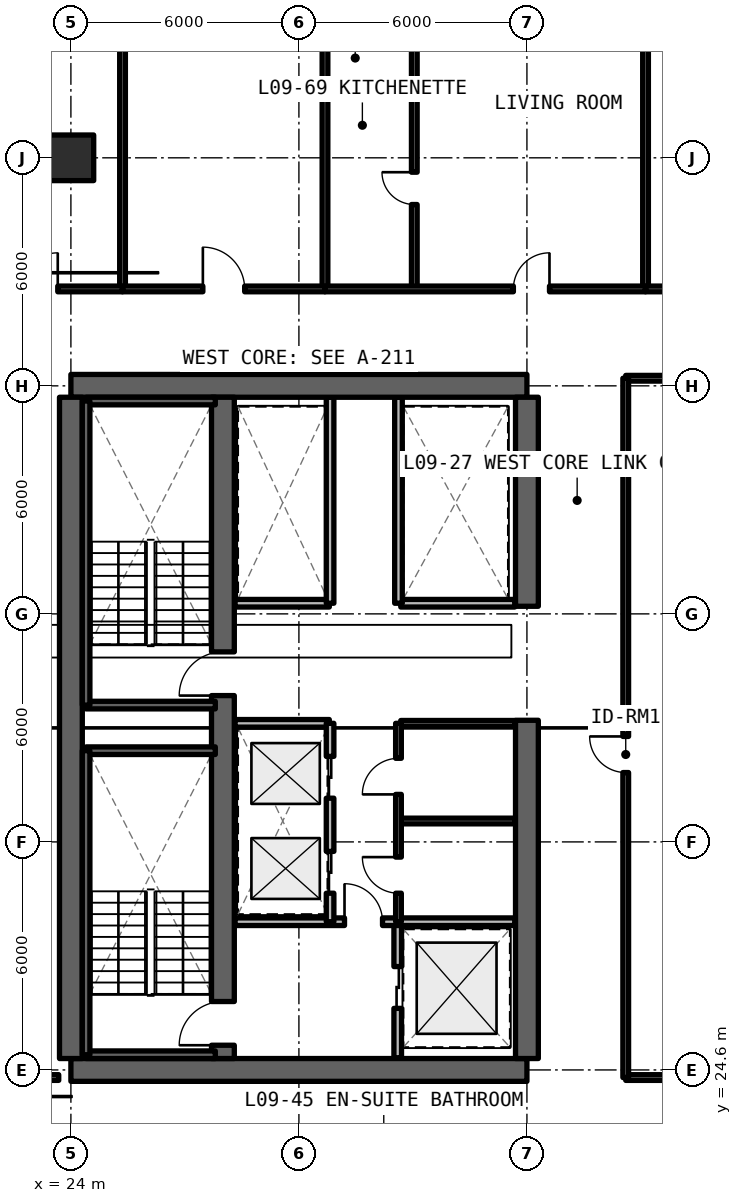
"""IFC4 building model, lengths in metres.
Left out: names, types, materials, properties, quantities, classifications, styles, units other than length and angle.
Written with IfcOpenShell. Run it as: python <this file> out.ifc"""

import sys

from ifc_helpers import new_model, si_unit, direction, frame, frame_2d, origin, origin_2d, place, context, subcontext, project, spatial, rectangle, extrude, element, fill, save


model = new_model("IFC4")
c1 = context("Model", 3, precision=1e-05, world=origin(), true_north=direction((0.0, 1.0)))
c2 = subcontext(c1, "Body", "Model", "MODEL_VIEW")
j1 = project(units=[si_unit("LENGTHUNIT", "METRE"), si_unit("PLANEANGLEUNIT", "RADIAN")], contexts=[c1])
p1 = place(None, origin())
s1 = spatial("IfcSite", under=j1, at=p1, CompositionType="ELEMENT")
p2 = place(p1, origin())
s2 = spatial("IfcBuilding", under=s1, at=p2, CompositionType="ELEMENT")
p3 = place(p2, frame((0.0, 0.0, 35.64)))
s3 = spatial("IfcBuildingStorey", under=s2, at=p3, CompositionType="ELEMENT", Elevation=35.64)
for number, where, z_axis, x_axis in (
    (1, (24.0, 24.6, 0.0), (0.0, 0.0, 1.0), (1.0, 0.0, 0.0)),
    (2, (36.0, 42.6, 0.0), (0.0, 0.0, 1.0), (-1.0, 0.0, 0.0)),
):
    element("IfcWall", number, at=place(p3, frame(where, z_axis=z_axis, x_axis=x_axis)), inside=s3, PredefinedType="SHEAR", context=c2, shape_type="SweptSolid", body=[
        extrude(rectangle(XDim=12.0, YDim=0.6, at=frame_2d((6.0, 0.0))), origin(), (0.0, 0.0, 1.0), 3.3),
    ])
p4 = place(p3, frame((24.0, 24.9, 0.0), z_axis=(0.0, 0.0, 1.0), x_axis=(0.0, 1.0, 0.0)))
e3 = element("IfcWall", 3, at=p4, inside=s3, PredefinedType="SHEAR", context=c2, shape_type="SweptSolid", body=[
    extrude(rectangle(XDim=17.4, YDim=0.6, at=frame_2d((8.7, 0.0))), origin(), (0.0, 0.0, 1.0), 3.3),
])
p5 = place(p3, frame((36.0, 24.9, 0.0), z_axis=(0.0, 0.0, 1.0), x_axis=(0.0, 1.0, 0.0)))
e4 = element("IfcWall", 4, at=p5, inside=s3, PredefinedType="SHEAR", context=c2, shape_type="SweptSolid", body=[
    extrude(rectangle(XDim=8.9, YDim=0.6, at=frame_2d((4.45, 0.0))), origin(), (0.0, 0.0, 1.0), 3.3),
])
p6 = place(p3, frame((36.0, 36.8, 0.0), z_axis=(0.0, 0.0, 1.0), x_axis=(0.0, 1.0, 0.0)))
e5 = element("IfcWall", 5, at=p6, inside=s3, PredefinedType="SHEAR", context=c2, shape_type="SweptSolid", body=[
    extrude(rectangle(XDim=5.5, YDim=0.6, at=frame_2d((2.75, 0.0))), origin(), (0.0, 0.0, 1.0), 3.3),
])
p7 = place(p3, frame((28.0, 24.9, 0.0), z_axis=(0.0, 0.0, 1.0), x_axis=(0.0, 1.0, 0.0)))
e6 = element("IfcWall", 6, at=p7, inside=s3, PredefinedType="SHEAR", context=c2, shape_type="SweptSolid", body=[
    extrude(rectangle(XDim=17.4, YDim=0.6, at=frame_2d((8.7, 0.0))), origin(), (0.0, 0.0, 1.0), 3.3),
])
p8 = place(p7, frame((0.35, 0.0, 0.0)))
e7 = element("IfcOpeningElement", 7, at=p8, cuts=e6, PredefinedType="OPENING", context=c2, shape_type="SweptSolid", body=[
    extrude(rectangle(XDim=1.15, YDim=2.15, at=frame_2d((0.575, 1.075))), frame((0.0, 0.31, 0.0), z_axis=(0.0, -1.0, 0.0), x_axis=(1.0, 0.0, 0.0)), (0.0, 0.0, 1.0), 0.62),
])
p9 = place(p7, frame((9.55, 0.0, 0.0)))
e8 = element("IfcOpeningElement", 8, at=p9, cuts=e6, PredefinedType="OPENING", context=c2, shape_type="SweptSolid", body=[
    extrude(rectangle(XDim=1.15, YDim=2.15, at=frame_2d((0.575, 1.075))), frame((0.0, 0.31, 0.0), z_axis=(0.0, -1.0, 0.0), x_axis=(1.0, 0.0, 0.0)), (0.0, 0.0, 1.0), 0.62),
])
p10 = place(p3, frame((24.0, 48.6, 0.0), z_axis=(0.0, 0.0, 1.0), x_axis=(1.0, 0.0, 0.0)))
e9 = element("IfcColumn", 9, at=p10, inside=s3, PredefinedType="COLUMN", context=c2, shape_type="SweptSolid", body=[
    extrude(rectangle(XDim=1.2, YDim=1.2, at=origin_2d()), origin(), (0.0, 0.0, 1.0), 3.3),
])
p11 = place(p3, frame((32.6, 24.92, 0.0), z_axis=(0.0, 0.0, 1.0), x_axis=(0.0, 1.0, 0.0)))
e10 = element("IfcWall", 10, at=p11, inside=s3, PredefinedType="SOLIDWALL", context=c2, shape_type="SweptSolid", body=[
    extrude(rectangle(XDim=3.58, YDim=0.2, at=frame_2d((1.79, 0.0))), origin(), (0.0, 0.0, 1.0), 2.35),
])
p12 = place(p11, frame((1.3, 0.0, 0.0)))
e11 = element("IfcOpeningElement", 11, at=p12, cuts=e10, PredefinedType="OPENING", context=c2, shape_type="SweptSolid", body=[
    extrude(rectangle(XDim=1.1, YDim=2.2, at=frame_2d((0.55, 1.1))), frame((0.0, 0.11, 0.0), z_axis=(0.0, -1.0, 0.0), x_axis=(1.0, 0.0, 0.0)), (0.0, 0.0, 1.0), 0.22),
])
p13 = place(p3, frame((28.32, 28.5, 0.0), z_axis=(0.0, 0.0, 1.0), x_axis=(1.0, 0.0, 0.0)))
e12 = element("IfcWall", 12, at=p13, inside=s3, PredefinedType="SOLIDWALL", context=c2, shape_type="SweptSolid", body=[
    extrude(rectangle(XDim=7.36, YDim=0.2, at=frame_2d((3.68, 0.0))), origin(), (0.0, 0.0, 1.0), 2.35),
])
p14 = place(p13, frame((2.88, 0.0, 0.0)))
e13 = element("IfcOpeningElement", 13, at=p14, cuts=e12, PredefinedType="OPENING", context=c2, shape_type="SweptSolid", body=[
    extrude(rectangle(XDim=1.0, YDim=2.15, at=frame_2d((0.5, 1.075))), frame((0.0, 0.11, 0.0), z_axis=(0.0, -1.0, 0.0), x_axis=(1.0, 0.0, 0.0)), (0.0, 0.0, 1.0), 0.22),
])
p15 = place(p3, frame((28.32, 33.72, 0.0), z_axis=(0.0, 0.0, 1.0), x_axis=(1.0, 0.0, 0.0)))
e14 = element("IfcWall", 14, at=p15, inside=s3, PredefinedType="SOLIDWALL", context=c2, shape_type="SweptSolid", body=[
    extrude(rectangle(XDim=2.48, YDim=0.2, at=frame_2d((1.24, 0.0))), origin(), (0.0, 0.0, 1.0), 2.35),
])
p16 = place(p3, frame((30.82, 28.5, 0.0), z_axis=(0.0, 0.0, 1.0), x_axis=(0.0, 1.0, 0.0)))
e15 = element("IfcWall", 15, at=p16, inside=s3, PredefinedType="SOLIDWALL", context=c2, shape_type="SweptSolid", body=[
    extrude(rectangle(XDim=5.22, YDim=0.2, at=frame_2d((2.61, 0.0))), origin(), (0.0, 0.0, 1.0), 2.35),
])
p17 = place(p16, frame((0.75, 0.0, 0.0)))
e16 = element("IfcOpeningElement", 16, at=p17, cuts=e15, PredefinedType="OPENING", context=c2, shape_type="SweptSolid", body=[
    extrude(rectangle(XDim=1.1, YDim=2.2, at=frame_2d((0.55, 1.1))), frame((0.0, 0.11, 0.0), z_axis=(0.0, -1.0, 0.0), x_axis=(1.0, 0.0, 0.0)), (0.0, 0.0, 1.0), 0.22),
])
p18 = place(p16, frame((3.25, 0.0, 0.0)))
e17 = element("IfcOpeningElement", 17, at=p18, cuts=e15, PredefinedType="OPENING", context=c2, shape_type="SweptSolid", body=[
    extrude(rectangle(XDim=1.1, YDim=2.2, at=frame_2d((0.55, 1.1))), frame((0.0, 0.11, 0.0), z_axis=(0.0, -1.0, 0.0), x_axis=(1.0, 0.0, 0.0)), (0.0, 0.0, 1.0), 0.22),
])
for number, where, z_axis, x_axis in (
    (18, (32.68, 31.15, 0.0), (0.0, 0.0, 1.0), (1.0, 0.0, 0.0)),
    (19, (32.68, 33.72, 0.0), (0.0, 0.0, 1.0), (1.0, 0.0, 0.0)),
):
    element("IfcWall", number, at=place(p3, frame(where, z_axis=z_axis, x_axis=x_axis)), inside=s3, PredefinedType="SOLIDWALL", context=c2, shape_type="SweptSolid", body=[
        extrude(rectangle(XDim=3.0, YDim=0.15, at=frame_2d((1.5, 0.0))), origin(), (0.0, 0.0, 1.0), 2.35),
    ])
p19 = place(p3, frame((32.62, 28.5, 0.0), z_axis=(0.0, 0.0, 1.0), x_axis=(0.0, 1.0, 0.0)))
e20 = element("IfcWall", 20, at=p19, inside=s3, PredefinedType="SOLIDWALL", context=c2, shape_type="SweptSolid", body=[
    extrude(rectangle(XDim=5.22, YDim=0.15, at=frame_2d((2.61, 0.0))), origin(), (0.0, 0.0, 1.0), 2.35),
])
p20 = place(p19, frame((0.75, 0.0, 0.0)))
e21 = element("IfcOpeningElement", 21, at=p20, cuts=e20, PredefinedType="OPENING", context=c2, shape_type="SweptSolid", body=[
    extrude(rectangle(XDim=0.95, YDim=2.15, at=frame_2d((0.475, 1.075))), frame((0.0, 0.085, 0.0), z_axis=(0.0, -1.0, 0.0), x_axis=(1.0, 0.0, 0.0)), (0.0, 0.0, 1.0), 0.17),
])
p21 = place(p19, frame((3.35, 0.0, 0.0)))
e22 = element("IfcOpeningElement", 22, at=p21, cuts=e20, PredefinedType="OPENING", context=c2, shape_type="SweptSolid", body=[
    extrude(rectangle(XDim=0.95, YDim=2.15, at=frame_2d((0.475, 1.075))), frame((0.0, 0.085, 0.0), z_axis=(0.0, -1.0, 0.0), x_axis=(1.0, 0.0, 0.0)), (0.0, 0.0, 1.0), 0.17),
])
p22 = place(p3, frame((28.32, 36.88, 0.0), z_axis=(0.0, 0.0, 1.0), x_axis=(1.0, 0.0, 0.0)))
e23 = element("IfcWall", 23, at=p22, inside=s3, PredefinedType="SOLIDWALL", context=c2, shape_type="SweptSolid", body=[
    extrude(rectangle(XDim=2.48, YDim=0.2, at=frame_2d((1.24, 0.0))), origin(), (0.0, 0.0, 1.0), 2.35),
])
p23 = place(p3, frame((30.82, 36.88, 0.0), z_axis=(0.0, 0.0, 1.0), x_axis=(0.0, 1.0, 0.0)))
e24 = element("IfcWall", 24, at=p23, inside=s3, PredefinedType="SOLIDWALL", context=c2, shape_type="SweptSolid", body=[
    extrude(rectangle(XDim=5.42, YDim=0.2, at=frame_2d((2.71, 0.0))), origin(), (0.0, 0.0, 1.0), 2.35),
])
p24 = place(p3, frame((32.68, 36.88, 0.0), z_axis=(0.0, 0.0, 1.0), x_axis=(1.0, 0.0, 0.0)))
e25 = element("IfcWall", 25, at=p24, inside=s3, PredefinedType="SOLIDWALL", context=c2, shape_type="SweptSolid", body=[
    extrude(rectangle(XDim=3.0, YDim=0.2, at=frame_2d((1.5, 0.0))), origin(), (0.0, 0.0, 1.0), 2.35),
])
p25 = place(p3, frame((32.62, 36.88, 0.0), z_axis=(0.0, 0.0, 1.0), x_axis=(0.0, 1.0, 0.0)))
e26 = element("IfcWall", 26, at=p25, inside=s3, PredefinedType="SOLIDWALL", context=c2, shape_type="SweptSolid", body=[
    extrude(rectangle(XDim=5.42, YDim=0.2, at=frame_2d((2.71, 0.0))), origin(), (0.0, 0.0, 1.0), 2.35),
])
for number, where, z_axis, x_axis in (
    (27, (38.6, 24.4, 0.0), (0.0, 0.0, 1.0), (1.0, 0.0, 0.0)),
    (28, (38.6, 42.8, 0.0), (0.0, 0.0, 1.0), (1.0, 0.0, 0.0)),
):
    element("IfcWall", number, at=place(p3, frame(where, z_axis=z_axis, x_axis=x_axis)), inside=s3, PredefinedType="SOLIDWALL", context=c2, shape_type="SweptSolid", body=[
        extrude(rectangle(XDim=8.25, YDim=0.15, at=frame_2d((4.125, 0.0))), origin(), (0.0, 0.0, 1.0), 2.295),
    ])
p26 = place(p3, frame((38.6, 24.4, 0.0), z_axis=(0.0, 0.0, 1.0), x_axis=(0.0, 1.0, 0.0)))
e29 = element("IfcWall", 29, at=p26, inside=s3, PredefinedType="SOLIDWALL", context=c2, shape_type="SweptSolid", body=[
    extrude(rectangle(XDim=18.4, YDim=0.15, at=frame_2d((9.2, 0.0))), origin(), (0.0, 0.0, 1.0), 2.35),
])
p27 = place(p26, frame((8.025, 0.0, 0.0)))
e30 = element("IfcOpeningElement", 30, at=p27, cuts=e29, PredefinedType="OPENING", context=c2, shape_type="SweptSolid", body=[
    extrude(rectangle(XDim=0.95, YDim=2.15, at=frame_2d((0.475, 1.075))), frame((0.0, 0.085, 0.0), z_axis=(0.0, -1.0, 0.0), x_axis=(1.0, 0.0, 0.0)), (0.0, 0.0, 1.0), 0.17),
])
p28 = place(p3, frame((16.84, 24.4, 0.0), z_axis=(0.0, 0.0, 1.0), x_axis=(1.0, 0.0, 0.0)))
e31 = element("IfcWall", 31, at=p28, inside=s3, PredefinedType="SOLIDWALL", context=c2, shape_type="SweptSolid", body=[
    extrude(rectangle(XDim=6.84, YDim=0.15, at=frame_2d((3.42, 0.0))), origin(), (0.0, 0.0, 1.0), 2.295),
])
p29 = place(p28, frame((2.945, 0.0, 0.0)))
e32 = element("IfcOpeningElement", 32, at=p29, cuts=e31, PredefinedType="OPENING", context=c2, shape_type="SweptSolid", body=[
    extrude(rectangle(XDim=0.95, YDim=2.15, at=frame_2d((0.475, 1.075))), frame((0.0, 0.085, 0.0), z_axis=(0.0, -1.0, 0.0), x_axis=(1.0, 0.0, 0.0)), (0.0, 0.0, 1.0), 0.17),
])
p30 = place(p3, frame((25.359, 45.15, 0.0), z_axis=(0.0, 0.0, 1.0), x_axis=(0.0, 1.0, 0.0)))
e33 = element("IfcWall", 33, at=p30, inside=s3, PredefinedType="SOLIDWALL", context=c2, shape_type="SweptSolid", body=[
    extrude(rectangle(XDim=14.17, YDim=0.15, at=frame_2d((7.085, 0.0))), origin(), (0.0, 0.0, 1.0), 2.35),
])
p31 = place(p3, frame((21.0, 45.15, 0.0), z_axis=(0.0, 0.0, 1.0), x_axis=(1.0, 0.0, 0.0)))
e34 = element("IfcWall", 34, at=p31, inside=s3, PredefinedType="SOLIDWALL", context=c2, shape_type="SweptSolid", body=[
    extrude(rectangle(XDim=4.359, YDim=0.15, at=frame_2d((2.179, 0.0))), origin(), (0.0, 0.0, 1.0), 2.35),
])
p32 = place(p31, frame((1.704, 0.0, 0.0)))
e35 = element("IfcOpeningElement", 35, at=p32, cuts=e34, PredefinedType="OPENING", context=c2, shape_type="SweptSolid", body=[
    extrude(rectangle(XDim=0.95, YDim=2.15, at=frame_2d((0.475, 1.075))), frame((0.0, 0.085, 0.0), z_axis=(0.0, -1.0, 0.0), x_axis=(1.0, 0.0, 0.0)), (0.0, 0.0, 1.0), 0.17),
])
p33 = place(p3, frame((30.686, 45.15, 0.0), z_axis=(0.0, 0.0, 1.0), x_axis=(0.0, 1.0, 0.0)))
e36 = element("IfcWall", 36, at=p33, inside=s3, PredefinedType="SOLIDWALL", context=c2, shape_type="SweptSolid", body=[
    extrude(rectangle(XDim=14.17, YDim=0.15, at=frame_2d((7.085, 0.0))), origin(), (0.0, 0.0, 1.0), 2.35),
])
p34 = place(p3, frame((25.359, 45.15, 0.0), z_axis=(0.0, 0.0, 1.0), x_axis=(1.0, 0.0, 0.0)))
e37 = element("IfcWall", 37, at=p34, inside=s3, PredefinedType="SOLIDWALL", context=c2, shape_type="SweptSolid", body=[
    extrude(rectangle(XDim=5.327, YDim=0.15, at=frame_2d((2.664, 0.0))), origin(), (0.0, 0.0, 1.0), 2.35),
])
p35 = place(p34, frame((2.114, 0.0, 0.0)))
e38 = element("IfcOpeningElement", 38, at=p35, cuts=e37, PredefinedType="OPENING", context=c2, shape_type="SweptSolid", body=[
    extrude(rectangle(XDim=1.1, YDim=2.15, at=frame_2d((0.55, 1.075))), frame((0.0, 0.085, 0.0), z_axis=(0.0, -1.0, 0.0), x_axis=(1.0, 0.0, 0.0)), (0.0, 0.0, 1.0), 0.17),
])
p36 = place(p3, frame((39.121, 45.15, 0.0), z_axis=(0.0, 0.0, 1.0), x_axis=(0.0, 1.0, 0.0)))
e39 = element("IfcWall", 39, at=p36, inside=s3, PredefinedType="SOLIDWALL", context=c2, shape_type="SweptSolid", body=[
    extrude(rectangle(XDim=14.17, YDim=0.15, at=frame_2d((7.085, 0.0))), origin(), (0.0, 0.0, 1.0), 2.35),
])
p37 = place(p3, frame((30.686, 50.442, 0.0), z_axis=(0.0, 0.0, 1.0), x_axis=(1.0, 0.0, 0.0)))
e40 = element("IfcWall", 40, at=p37, inside=s3, PredefinedType="PARTITIONING", context=c2, shape_type="SweptSolid", body=[
    extrude(rectangle(XDim=2.35, YDim=0.15, at=frame_2d((1.175, 0.0))), origin(), (0.0, 0.0, 1.0), 2.35),
])
p38 = place(p3, frame((33.036, 45.15, 0.0), z_axis=(0.0, 0.0, 1.0), x_axis=(0.0, 1.0, 0.0)))
e41 = element("IfcWall", 41, at=p38, inside=s3, PredefinedType="PARTITIONING", context=c2, shape_type="SweptSolid", body=[
    extrude(rectangle(XDim=8.97, YDim=0.15, at=frame_2d((4.485, 0.0))), origin(), (0.0, 0.0, 1.0), 2.35),
])
p39 = place(p38, frame((2.221, 0.0, 0.0)))
e42 = element("IfcOpeningElement", 42, at=p39, cuts=e41, PredefinedType="OPENING", context=c2, shape_type="SweptSolid", body=[
    extrude(rectangle(XDim=0.85, YDim=2.1, at=frame_2d((0.425, 1.05))), frame((0.0, 0.085, 0.0), z_axis=(0.0, -1.0, 0.0), x_axis=(1.0, 0.0, 0.0)), (0.0, 0.0, 1.0), 0.17),
])
p40 = place(p38, frame((6.706, 0.0, 0.0)))
e43 = element("IfcOpeningElement", 43, at=p40, cuts=e41, PredefinedType="OPENING", context=c2, shape_type="SweptSolid", body=[
    extrude(rectangle(XDim=0.85, YDim=2.1, at=frame_2d((0.425, 1.05))), frame((0.0, 0.085, 0.0), z_axis=(0.0, -1.0, 0.0), x_axis=(1.0, 0.0, 0.0)), (0.0, 0.0, 1.0), 0.17),
])
p41 = place(p3, frame((30.686, 45.15, 0.0), z_axis=(0.0, 0.0, 1.0), x_axis=(1.0, 0.0, 0.0)))
e44 = element("IfcWall", 44, at=p41, inside=s3, PredefinedType="SOLIDWALL", context=c2, shape_type="SweptSolid", body=[
    extrude(rectangle(XDim=8.435, YDim=0.15, at=frame_2d((4.217, 0.0))), origin(), (0.0, 0.0, 1.0), 2.35),
])
p42 = place(p41, frame((4.958, 0.0, 0.0)))
e45 = element("IfcOpeningElement", 45, at=p42, cuts=e44, PredefinedType="OPENING", context=c2, shape_type="SweptSolid", body=[
    extrude(rectangle(XDim=0.95, YDim=2.15, at=frame_2d((0.475, 1.075))), frame((0.0, 0.085, 0.0), z_axis=(0.0, -1.0, 0.0), x_axis=(1.0, 0.0, 0.0)), (0.0, 0.0, 1.0), 0.17),
])
p43 = place(p3, frame((39.121, 45.15, 0.0), z_axis=(0.0, 0.0, 1.0), x_axis=(1.0, 0.0, 0.0)))
e46 = element("IfcWall", 46, at=p43, inside=s3, PredefinedType="SOLIDWALL", context=c2, shape_type="SweptSolid", body=[
    extrude(rectangle(XDim=4.359, YDim=0.15, at=frame_2d((2.179, 0.0))), origin(), (0.0, 0.0, 1.0), 2.35),
])
p44 = place(p43, frame((1.704, 0.0, 0.0)))
e47 = element("IfcOpeningElement", 47, at=p44, cuts=e46, PredefinedType="OPENING", context=c2, shape_type="SweptSolid", body=[
    extrude(rectangle(XDim=0.95, YDim=2.15, at=frame_2d((0.475, 1.075))), frame((0.0, 0.085, 0.0), z_axis=(0.0, -1.0, 0.0), x_axis=(1.0, 0.0, 0.0)), (0.0, 0.0, 1.0), 0.17),
])
for number, where, z_axis, x_axis in (
    (48, (24.4, 25.0, 0.0), (0.0, 0.0, 1.0), (1.0, 0.0, 0.0)),
    (49, (27.8, 33.0, 0.0), (0.0, 0.0, 1.0), (-1.0, 0.0, 0.0)),
):
    element("IfcWall", number, at=place(p3, frame(where, z_axis=z_axis, x_axis=x_axis)), inside=s3, PredefinedType="SOLIDWALL", context=c2, shape_type="SweptSolid", body=[
        extrude(rectangle(XDim=3.4, YDim=0.2, at=frame_2d((1.7, 0.0))), origin(), (0.0, 0.0, 1.0), 3.3),
    ])
p45 = place(p3, frame((24.4, 33.0, 0.0), z_axis=(0.0, 0.0, 1.0), x_axis=(0.0, -1.0, 0.0)))
e50 = element("IfcWall", 50, at=p45, inside=s3, PredefinedType="SOLIDWALL", context=c2, shape_type="SweptSolid", body=[
    extrude(rectangle(XDim=8.0, YDim=0.2, at=frame_2d((4.0, 0.0))), origin(), (0.0, 0.0, 1.0), 3.3),
])
for number, where, z_axis, x_axis in (
    (51, (24.4, 34.2, 0.0), (0.0, 0.0, 1.0), (1.0, 0.0, 0.0)),
    (52, (27.8, 42.2, 0.0), (0.0, 0.0, 1.0), (-1.0, 0.0, 0.0)),
):
    element("IfcWall", number, at=place(p3, frame(where, z_axis=z_axis, x_axis=x_axis)), inside=s3, PredefinedType="SOLIDWALL", context=c2, shape_type="SweptSolid", body=[
        extrude(rectangle(XDim=3.4, YDim=0.2, at=frame_2d((1.7, 0.0))), origin(), (0.0, 0.0, 1.0), 3.3),
    ])
p46 = place(p3, frame((24.4, 42.2, 0.0), z_axis=(0.0, 0.0, 1.0), x_axis=(0.0, -1.0, 0.0)))
e53 = element("IfcWall", 53, at=p46, inside=s3, PredefinedType="SOLIDWALL", context=c2, shape_type="SweptSolid", body=[
    extrude(rectangle(XDim=8.0, YDim=0.2, at=frame_2d((4.0, 0.0))), origin(), (0.0, 0.0, 1.0), 3.3),
])
p47 = place(p12, origin())
e54 = element("IfcDoor", 54, at=p47, inside=s3, OperationType="SLIDING_TO_LEFT", PredefinedType="DOOR", context=c2, shape_type="SweptSolid", body=[
    extrude(rectangle(XDim=1.1, YDim=2.2, at=frame_2d((0.55, 1.1))), frame((0.0, 0.025, 0.0), z_axis=(0.0, -1.0, 0.0), x_axis=(1.0, 0.0, 0.0)), (0.0, 0.0, 1.0), 0.05),
])
fill(e11, e54)
p48 = place(p14, origin())
e55 = element("IfcDoor", 55, at=p48, inside=s3, OperationType="SINGLE_SWING_LEFT", PredefinedType="DOOR", context=c2, shape_type="SweptSolid", body=[
    extrude(rectangle(XDim=1.0, YDim=2.15, at=frame_2d((0.5, 1.075))), frame((0.0, 0.025, 0.0), z_axis=(0.0, -1.0, 0.0), x_axis=(1.0, 0.0, 0.0)), (0.0, 0.0, 1.0), 0.05),
])
fill(e13, e55)
p49 = place(p17, origin())
e56 = element("IfcDoor", 56, at=p49, inside=s3, OperationType="SLIDING_TO_LEFT", PredefinedType="DOOR", context=c2, shape_type="SweptSolid", body=[
    extrude(rectangle(XDim=1.1, YDim=2.2, at=frame_2d((0.55, 1.1))), frame((0.0, 0.025, 0.0), z_axis=(0.0, -1.0, 0.0), x_axis=(1.0, 0.0, 0.0)), (0.0, 0.0, 1.0), 0.05),
])
fill(e16, e56)
p50 = place(p18, origin())
e57 = element("IfcDoor", 57, at=p50, inside=s3, OperationType="SLIDING_TO_RIGHT", PredefinedType="DOOR", context=c2, shape_type="SweptSolid", body=[
    extrude(rectangle(XDim=1.1, YDim=2.2, at=frame_2d((0.55, 1.1))), frame((0.0, 0.025, 0.0), z_axis=(0.0, -1.0, 0.0), x_axis=(1.0, 0.0, 0.0)), (0.0, 0.0, 1.0), 0.05),
])
fill(e17, e57)
p51 = place(p20, origin())
e58 = element("IfcDoor", 58, at=p51, inside=s3, OperationType="SINGLE_SWING_RIGHT", PredefinedType="DOOR", context=c2, shape_type="SweptSolid", body=[
    extrude(rectangle(XDim=0.95, YDim=2.15, at=frame_2d((0.475, 1.075))), frame((0.0, 0.025, 0.0), z_axis=(0.0, -1.0, 0.0), x_axis=(1.0, 0.0, 0.0)), (0.0, 0.0, 1.0), 0.05),
])
fill(e21, e58)
p52 = place(p21, origin())
e59 = element("IfcDoor", 59, at=p52, inside=s3, OperationType="SINGLE_SWING_LEFT", PredefinedType="DOOR", context=c2, shape_type="SweptSolid", body=[
    extrude(rectangle(XDim=0.95, YDim=2.15, at=frame_2d((0.475, 1.075))), frame((0.0, 0.025, 0.0), z_axis=(0.0, -1.0, 0.0), x_axis=(1.0, 0.0, 0.0)), (0.0, 0.0, 1.0), 0.05),
])
fill(e22, e59)
p53 = place(p27, origin())
e60 = element("IfcDoor", 60, at=p53, inside=s3, OperationType="SINGLE_SWING_RIGHT", PredefinedType="DOOR", context=c2, shape_type="SweptSolid", body=[
    extrude(rectangle(XDim=0.95, YDim=2.15, at=frame_2d((0.475, 1.075))), frame((0.0, 0.025, 0.0), z_axis=(0.0, -1.0, 0.0), x_axis=(1.0, 0.0, 0.0)), (0.0, 0.0, 1.0), 0.05),
])
fill(e30, e60)
p54 = place(p32, origin())
e61 = element("IfcDoor", 61, at=p54, inside=s3, OperationType="SINGLE_SWING_RIGHT", PredefinedType="DOOR", context=c2, shape_type="SweptSolid", body=[
    extrude(rectangle(XDim=0.95, YDim=2.15, at=frame_2d((0.475, 1.075))), frame((0.0, 0.025, 0.0), z_axis=(0.0, -1.0, 0.0), x_axis=(1.0, 0.0, 0.0)), (0.0, 0.0, 1.0), 0.05),
])
fill(e35, e61)
p55 = place(p35, origin())
e62 = element("IfcDoor", 62, at=p55, inside=s3, OperationType="SINGLE_SWING_LEFT", PredefinedType="DOOR", context=c2, shape_type="SweptSolid", body=[
    extrude(rectangle(XDim=1.1, YDim=2.15, at=frame_2d((0.55, 1.075))), frame((0.0, 0.025, 0.0), z_axis=(0.0, -1.0, 0.0), x_axis=(1.0, 0.0, 0.0)), (0.0, 0.0, 1.0), 0.05),
])
fill(e38, e62)
p56 = place(p39, origin())
e63 = element("IfcDoor", 63, at=p56, inside=s3, OperationType="SINGLE_SWING_RIGHT", PredefinedType="DOOR", context=c2, shape_type="SweptSolid", body=[
    extrude(rectangle(XDim=0.85, YDim=2.1, at=frame_2d((0.425, 1.05))), frame((0.0, 0.025, 0.0), z_axis=(0.0, -1.0, 0.0), x_axis=(1.0, 0.0, 0.0)), (0.0, 0.0, 1.0), 0.05),
])
fill(e42, e63)
p57 = place(p42, origin())
e64 = element("IfcDoor", 64, at=p57, inside=s3, OperationType="SINGLE_SWING_RIGHT", PredefinedType="DOOR", context=c2, shape_type="SweptSolid", body=[
    extrude(rectangle(XDim=0.95, YDim=2.15, at=frame_2d((0.475, 1.075))), frame((0.0, 0.025, 0.0), z_axis=(0.0, -1.0, 0.0), x_axis=(1.0, 0.0, 0.0)), (0.0, 0.0, 1.0), 0.05),
])
fill(e45, e64)
p58 = place(p8, origin())
e65 = element("IfcDoor", 65, at=p58, inside=s3, OperationType="SINGLE_SWING_LEFT", PredefinedType="DOOR", context=c2, shape_type="SweptSolid", body=[
    extrude(rectangle(XDim=1.15, YDim=2.15, at=frame_2d((0.575, 1.075))), frame((0.0, 0.025, 0.0), z_axis=(0.0, -1.0, 0.0), x_axis=(1.0, 0.0, 0.0)), (0.0, 0.0, 1.0), 0.05),
])
fill(e7, e65)
p59 = place(p9, origin())
e66 = element("IfcDoor", 66, at=p59, inside=s3, OperationType="SINGLE_SWING_RIGHT", PredefinedType="DOOR", context=c2, shape_type="SweptSolid", body=[
    extrude(rectangle(XDim=1.15, YDim=2.15, at=frame_2d((0.575, 1.075))), frame((0.0, 0.025, 0.0), z_axis=(0.0, -1.0, 0.0), x_axis=(1.0, 0.0, 0.0)), (0.0, 0.0, 1.0), 0.05),
])
fill(e8, e66)
save(model, sys.argv[1])
